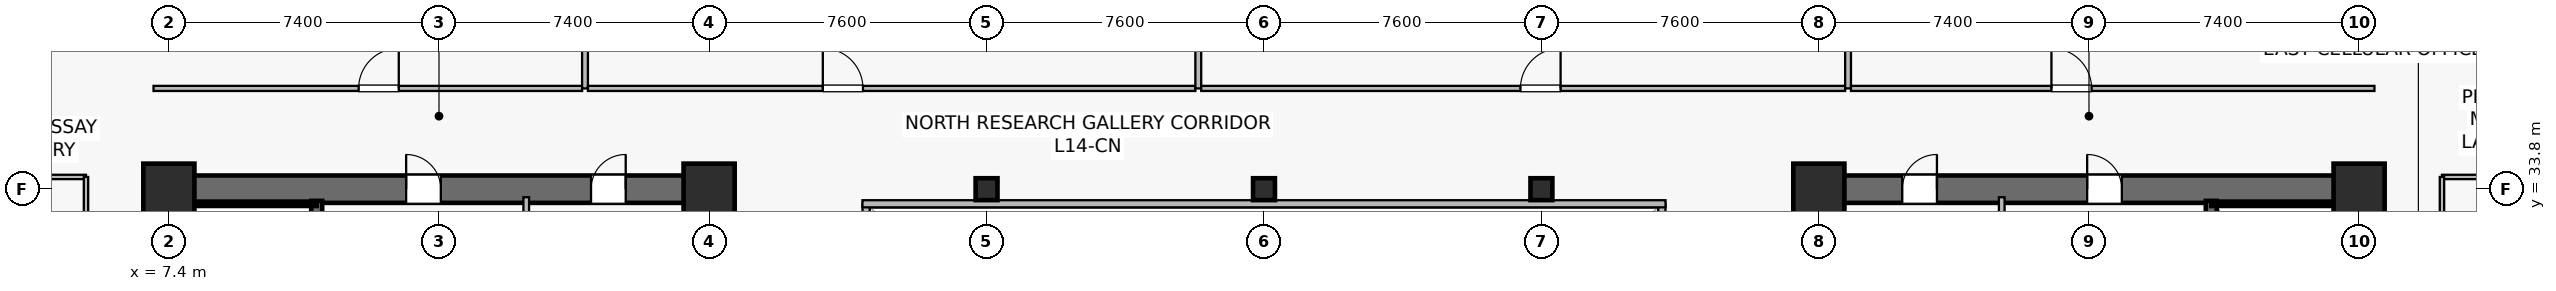
"""IFC4 building model, lengths in metres.
Left out: names, types, materials, properties, quantities, classifications, styles, units other than length and angle.
Written with IfcOpenShell. Run it as: python <this file> out.ifc"""

import sys

from ifc_helpers import new_model, si_unit, direction, frame, frame_2d, origin, origin_2d, place, context, subcontext, project, spatial, rectangle, hollow_rectangle, extrude, source, transform, mapped, element, fill, save


model = new_model("IFC4")
c1 = context("Model", 3, precision=1e-05, world=origin(), true_north=direction((0.0, 1.0)))
c2 = subcontext(c1, "Body", "Model", "MODEL_VIEW")
j1 = project(units=[si_unit("LENGTHUNIT", "METRE"), si_unit("PLANEANGLEUNIT", "RADIAN")], contexts=[c1])
p1 = place(None, origin())
s1 = spatial("IfcSite", under=j1, at=p1, CompositionType="ELEMENT")
p2 = place(p1, origin())
s2 = spatial("IfcBuilding", under=s1, at=p2, CompositionType="ELEMENT")
p3 = place(p2, frame((0.0, 0.0, 58.0)))
s3 = spatial("IfcBuildingStorey", under=s2, at=p3, CompositionType="ELEMENT", Elevation=58.0)
p4 = place(p3, frame((7.025, 33.8, 0.0), z_axis=(0.0, 0.0, 1.0), x_axis=(1.0, 0.0, 0.0)))
e1 = element("IfcWall", 1, at=p4, inside=s3, PredefinedType="SHEAR", context=c2, shape_type="SweptSolid", body=[
    extrude(rectangle(XDim=15.55, YDim=0.75, at=frame_2d((7.775, 0.0))), origin(), (0.0, 0.0, 1.0), 3.78),
])
p5 = place(p4, frame((6.875, 0.0, 0.0)))
e2 = element("IfcOpeningElement", 2, at=p5, cuts=e1, PredefinedType="OPENING", context=c2, shape_type="SweptSolid", body=[
    extrude(rectangle(XDim=0.95, YDim=2.15, at=frame_2d((0.475, 1.075))), frame((0.0, 0.385, 0.0), z_axis=(0.0, -1.0, 0.0), x_axis=(1.0, 0.0, 0.0)), (0.0, 0.0, 1.0), 0.77),
])
p6 = place(p4, frame((11.94, 0.0, 0.0)))
e3 = element("IfcOpeningElement", 3, at=p6, cuts=e1, PredefinedType="OPENING", context=c2, shape_type="SweptSolid", body=[
    extrude(rectangle(XDim=0.95, YDim=2.15, at=frame_2d((0.475, 1.075))), frame((0.0, 0.385, 0.0), z_axis=(0.0, -1.0, 0.0), x_axis=(1.0, 0.0, 0.0)), (0.0, 0.0, 1.0), 0.77),
])
p7 = place(p3, frame((7.4, 15.175, 0.0), z_axis=(0.0, 0.0, 1.0), x_axis=(0.0, 1.0, 0.0)))
e4 = element("IfcWall", 4, at=p7, inside=s3, PredefinedType="SHEAR", context=c2, shape_type="SweptSolid", body=[
    extrude(rectangle(XDim=18.25, YDim=0.75, at=frame_2d((9.125, 0.0))), origin(), (0.0, 0.0, 1.0), 3.78),
])
p8 = place(p3, frame((22.2, 15.175, 0.0), z_axis=(0.0, 0.0, 1.0), x_axis=(0.0, 1.0, 0.0)))
e5 = element("IfcWall", 5, at=p8, inside=s3, PredefinedType="SHEAR", context=c2, shape_type="SweptSolid", body=[
    extrude(rectangle(XDim=18.25, YDim=0.75, at=frame_2d((9.125, 0.0))), origin(), (0.0, 0.0, 1.0), 3.78),
])
p9 = place(p8, frame((3.375, 0.0, 0.0)))
e6 = element("IfcOpeningElement", 6, at=p9, cuts=e5, PredefinedType="OPENING", context=c2, shape_type="SweptSolid", body=[
    extrude(rectangle(XDim=1.42, YDim=2.2, at=frame_2d((0.71, 1.1))), frame((0.0, 0.385, 0.0), z_axis=(0.0, -1.0, 0.0), x_axis=(1.0, 0.0, 0.0)), (0.0, 0.0, 1.0), 0.77),
])
p10 = place(p3, frame((11.45, 24.85, 0.0), z_axis=(0.0, 0.0, 1.0), x_axis=(0.0, 1.0, 0.0)))
e7 = element("IfcWall", 7, at=p10, inside=s3, PredefinedType="SHEAR", context=c2, shape_type="SweptSolid", body=[
    extrude(rectangle(XDim=8.63, YDim=0.3, at=frame_2d((4.315, 0.0))), origin(), (0.0, 0.0, 1.0), 3.78),
])
p11 = place(p10, frame((0.42, 0.0, 0.0)))
e8 = element("IfcOpeningElement", 8, at=p11, cuts=e7, PredefinedType="OPENING", context=c2, shape_type="SweptSolid", body=[
    extrude(rectangle(XDim=1.1, YDim=2.15, at=frame_2d((0.55, 1.075))), frame((0.0, 0.16, 0.0), z_axis=(0.0, -1.0, 0.0), x_axis=(1.0, 0.0, 0.0)), (0.0, 0.0, 1.0), 0.32),
])
p12 = place(p3, frame((7.73, 33.4, 0.0), z_axis=(0.0, 0.0, 1.0), x_axis=(1.0, 0.0, 0.0)))
e9 = element("IfcWall", 9, at=p12, inside=s3, PredefinedType="SOLIDWALL", context=c2, shape_type="SweptSolid", body=[
    extrude(rectangle(XDim=3.72, YDim=0.12, at=frame_2d((1.86, 0.0))), origin(), (0.0, 0.0, 1.0), 3.78),
])
p13 = place(p3, frame((52.225, 33.8, 0.0), z_axis=(0.0, 0.0, 1.0), x_axis=(1.0, 0.0, 0.0)))
e10 = element("IfcWall", 10, at=p13, inside=s3, PredefinedType="SHEAR", context=c2, shape_type="SweptSolid", body=[
    extrude(rectangle(XDim=15.55, YDim=0.75, at=frame_2d((7.775, 0.0))), origin(), (0.0, 0.0, 1.0), 3.78),
])
p14 = place(p13, frame((7.725, 0.0, 0.0)))
e11 = element("IfcOpeningElement", 11, at=p14, cuts=e10, PredefinedType="OPENING", context=c2, shape_type="SweptSolid", body=[
    extrude(rectangle(XDim=0.95, YDim=2.15, at=frame_2d((0.475, 1.075))), frame((0.0, 0.385, 0.0), z_axis=(0.0, -1.0, 0.0), x_axis=(1.0, 0.0, 0.0)), (0.0, 0.0, 1.0), 0.77),
])
p15 = place(p13, frame((2.66, 0.0, 0.0)))
e12 = element("IfcOpeningElement", 12, at=p15, cuts=e10, PredefinedType="OPENING", context=c2, shape_type="SweptSolid", body=[
    extrude(rectangle(XDim=0.95, YDim=2.15, at=frame_2d((0.475, 1.075))), frame((0.0, 0.385, 0.0), z_axis=(0.0, -1.0, 0.0), x_axis=(1.0, 0.0, 0.0)), (0.0, 0.0, 1.0), 0.77),
])
p16 = place(p3, frame((52.6, 15.175, 0.0), z_axis=(0.0, 0.0, 1.0), x_axis=(0.0, 1.0, 0.0)))
e13 = element("IfcWall", 13, at=p16, inside=s3, PredefinedType="SHEAR", context=c2, shape_type="SweptSolid", body=[
    extrude(rectangle(XDim=18.25, YDim=0.75, at=frame_2d((9.125, 0.0))), origin(), (0.0, 0.0, 1.0), 3.78),
])
p17 = place(p16, frame((3.375, 0.0, 0.0)))
e14 = element("IfcOpeningElement", 14, at=p17, cuts=e13, PredefinedType="OPENING", context=c2, shape_type="SweptSolid", body=[
    extrude(rectangle(XDim=1.42, YDim=2.2, at=frame_2d((0.71, 1.1))), frame((0.0, 0.385, 0.0), z_axis=(0.0, -1.0, 0.0), x_axis=(1.0, 0.0, 0.0)), (0.0, 0.0, 1.0), 0.77),
])
p18 = place(p3, frame((67.4, 15.175, 0.0), z_axis=(0.0, 0.0, 1.0), x_axis=(0.0, 1.0, 0.0)))
e15 = element("IfcWall", 15, at=p18, inside=s3, PredefinedType="SHEAR", context=c2, shape_type="SweptSolid", body=[
    extrude(rectangle(XDim=18.25, YDim=0.75, at=frame_2d((9.125, 0.0))), origin(), (0.0, 0.0, 1.0), 3.78),
])
p19 = place(p3, frame((63.35, 24.85, 0.0), z_axis=(0.0, 0.0, 1.0), x_axis=(0.0, 1.0, 0.0)))
e16 = element("IfcWall", 16, at=p19, inside=s3, PredefinedType="SHEAR", context=c2, shape_type="SweptSolid", body=[
    extrude(rectangle(XDim=8.63, YDim=0.3, at=frame_2d((4.315, 0.0))), origin(), (0.0, 0.0, 1.0), 3.78),
])
p20 = place(p19, frame((0.42, 0.0, 0.0)))
e17 = element("IfcOpeningElement", 17, at=p20, cuts=e16, PredefinedType="OPENING", context=c2, shape_type="SweptSolid", body=[
    extrude(rectangle(XDim=1.1, YDim=2.15, at=frame_2d((0.55, 1.075))), frame((0.0, 0.16, 0.0), z_axis=(0.0, -1.0, 0.0), x_axis=(1.0, 0.0, 0.0)), (0.0, 0.0, 1.0), 0.32),
])
p21 = place(p3, frame((63.35, 33.4, 0.0), z_axis=(0.0, 0.0, 1.0), x_axis=(1.0, 0.0, 0.0)))
e18 = element("IfcWall", 18, at=p21, inside=s3, PredefinedType="SOLIDWALL", context=c2, shape_type="SweptSolid", body=[
    extrude(rectangle(XDim=3.72, YDim=0.12, at=frame_2d((1.86, 0.0))), origin(), (0.0, 0.0, 1.0), 3.78),
])
m1 = source(origin(), c2, "Body", "SweptSolid", [
    extrude(rectangle(XDim=1.4, YDim=1.4, at=origin_2d()), origin(), (0.0, 0.0, 1.0), 4.1),
])
for number, where, z_axis, x_axis in (
    (19, (7.4, 33.8, 0.0), (0.0, 0.0, 1.0), (1.0, 0.0, 0.0)),
    (20, (22.2, 33.8, 0.0), (0.0, 0.0, 1.0), (1.0, 0.0, 0.0)),
    (21, (52.6, 33.8, 0.0), (0.0, 0.0, 1.0), (1.0, 0.0, 0.0)),
    (22, (67.4, 33.8, 0.0), (0.0, 0.0, 1.0), (1.0, 0.0, 0.0)),
):
    element("IfcColumn", number, at=place(p3, frame(where, z_axis=z_axis, x_axis=x_axis)), inside=s3, PredefinedType="COLUMN", context=c2, shape_type="MappedRepresentation", body=[
        mapped(m1, transform((0.0, 0.0, 0.0), scale=1.0)),
    ])
m2 = source(origin(), c2, "Body", "SweptSolid", [
    extrude(hollow_rectangle(XDim=0.6, YDim=0.6, WallThickness=0.028, at=origin_2d()), origin(), (0.0, 0.0, 1.0), 4.1),
])
for number, where, z_axis, x_axis in (
    (23, (29.8, 33.8, 0.0), (0.0, 0.0, 1.0), (1.0, 0.0, 0.0)),
    (24, (37.4, 33.8, 0.0), (0.0, 0.0, 1.0), (1.0, 0.0, 0.0)),
    (25, (45.0, 33.8, 0.0), (0.0, 0.0, 1.0), (1.0, 0.0, 0.0)),
):
    element("IfcColumn", number, at=place(p3, frame(where, z_axis=z_axis, x_axis=x_axis)), inside=s3, PredefinedType="COLUMN", context=c2, shape_type="MappedRepresentation", body=[
        mapped(m2, transform((0.0, 0.0, 0.0), scale=1.0)),
    ])
for number, where, z_axis, x_axis in (
    (26, (17.19, 29.65, 0.0), (0.0, 0.0, 1.0), (0.0, 1.0, 0.0)),
    (27, (57.61, 29.65, 0.0), (0.0, 0.0, 1.0), (0.0, 1.0, 0.0)),
):
    element("IfcWall", number, at=place(p3, frame(where, z_axis=z_axis, x_axis=x_axis)), inside=s3, PredefinedType="PLUMBINGWALL", context=c2, shape_type="SweptSolid", body=[
        extrude(rectangle(XDim=3.93, YDim=0.155, at=frame_2d((1.965, 0.0))), origin(), (0.0, 0.0, 1.0), 3.78),
    ])
p22 = place(p3, frame((26.5, 15.2, 0.0), z_axis=(0.0, 0.0, 1.0), x_axis=(0.0, 1.0, 0.0)))
e28 = element("IfcWall", 28, at=p22, inside=s3, PredefinedType="SOLIDWALL", context=c2, shape_type="SweptSolid", body=[
    extrude(rectangle(XDim=18.2, YDim=0.195, at=frame_2d((9.1, 0.0))), origin(), (0.0, 0.0, 1.0), 3.78),
])
p23 = place(p22, frame((1.8, 0.0, 0.9)))
e29 = element("IfcOpeningElement", 29, at=p23, cuts=e28, PredefinedType="OPENING", context=c2, shape_type="SweptSolid", body=[
    extrude(rectangle(XDim=1.5, YDim=1.4, at=frame_2d((0.75, 0.7))), frame((0.0, 0.107, 0.0), z_axis=(0.0, -1.0, 0.0), x_axis=(1.0, 0.0, 0.0)), (0.0, 0.0, 1.0), 0.215),
])
p24 = place(p22, frame((13.2, 0.0, 0.9)))
e30 = element("IfcOpeningElement", 30, at=p24, cuts=e28, PredefinedType="OPENING", context=c2, shape_type="SweptSolid", body=[
    extrude(rectangle(XDim=1.5, YDim=1.4, at=frame_2d((0.75, 0.7))), frame((0.0, 0.107, 0.0), z_axis=(0.0, -1.0, 0.0), x_axis=(1.0, 0.0, 0.0)), (0.0, 0.0, 1.0), 0.215),
])
p25 = place(p3, frame((48.3, 15.2, 0.0), z_axis=(0.0, 0.0, 1.0), x_axis=(0.0, 1.0, 0.0)))
e31 = element("IfcWall", 31, at=p25, inside=s3, PredefinedType="SOLIDWALL", context=c2, shape_type="SweptSolid", body=[
    extrude(rectangle(XDim=18.2, YDim=0.195, at=frame_2d((9.1, 0.0))), origin(), (0.0, 0.0, 1.0), 3.78),
])
p26 = place(p25, frame((1.8, 0.0, 0.9)))
e32 = element("IfcOpeningElement", 32, at=p26, cuts=e31, PredefinedType="OPENING", context=c2, shape_type="SweptSolid", body=[
    extrude(rectangle(XDim=1.5, YDim=1.4, at=frame_2d((0.75, 0.7))), frame((0.0, 0.107, 0.0), z_axis=(0.0, -1.0, 0.0), x_axis=(1.0, 0.0, 0.0)), (0.0, 0.0, 1.0), 0.215),
])
p27 = place(p25, frame((13.2, 0.0, 0.9)))
e33 = element("IfcOpeningElement", 33, at=p27, cuts=e31, PredefinedType="OPENING", context=c2, shape_type="SweptSolid", body=[
    extrude(rectangle(XDim=1.5, YDim=1.4, at=frame_2d((0.75, 0.7))), frame((0.0, 0.107, 0.0), z_axis=(0.0, -1.0, 0.0), x_axis=(1.0, 0.0, 0.0)), (0.0, 0.0, 1.0), 0.215),
])
p28 = place(p3, frame((26.4, 33.4, 0.0), z_axis=(0.0, 0.0, 1.0), x_axis=(1.0, 0.0, 0.0)))
e34 = element("IfcWall", 34, at=p28, inside=s3, PredefinedType="SOLIDWALL", context=c2, shape_type="SweptSolid", body=[
    extrude(rectangle(XDim=22.0, YDim=0.195, at=frame_2d((11.0, 0.0))), origin(), (0.0, 0.0, 1.0), 3.78),
])
p29 = place(p3, frame((6.98, 36.56, 0.0), z_axis=(0.0, 0.0, 1.0), x_axis=(1.0, 0.0, 0.0)))
e35 = element("IfcWall", 35, at=p29, inside=s3, PredefinedType="PARTITIONING", context=c2, shape_type="SweptSolid", body=[
    extrude(rectangle(XDim=11.74, YDim=0.14, at=frame_2d((5.87, 0.0))), origin(), (0.0, 0.0, 1.0), 3.065),
])
p30 = place(p29, frame((5.618, 0.0, 0.0)))
e36 = element("IfcOpeningElement", 36, at=p30, cuts=e35, PredefinedType="OPENING", context=c2, shape_type="SweptSolid", body=[
    extrude(rectangle(XDim=1.1, YDim=2.18, at=frame_2d((0.55, 1.09))), frame((0.0, 0.08, 0.0), z_axis=(0.0, -1.0, 0.0), x_axis=(1.0, 0.0, 0.0)), (0.0, 0.0, 1.0), 0.16),
])
p31 = place(p3, frame((18.8, 36.56, 0.0), z_axis=(0.0, 0.0, 1.0), x_axis=(0.0, 1.0, 0.0)))
e37 = element("IfcWall", 37, at=p31, inside=s3, PredefinedType="PARTITIONING", context=c2, shape_type="SweptSolid", body=[
    extrude(rectangle(XDim=11.93, YDim=0.16, at=frame_2d((5.965, 0.0))), origin(), (0.0, 0.0, 1.0), 3.015),
])
p32 = place(p3, frame((18.88, 36.56, 0.0), z_axis=(0.0, 0.0, 1.0), x_axis=(1.0, 0.0, 0.0)))
e38 = element("IfcWall", 38, at=p32, inside=s3, PredefinedType="PARTITIONING", context=c2, shape_type="SweptSolid", body=[
    extrude(rectangle(XDim=16.64, YDim=0.14, at=frame_2d((8.32, 0.0))), origin(), (0.0, 0.0, 1.0), 3.065),
])
p33 = place(p32, frame((6.434, 0.0, 0.0)))
e39 = element("IfcOpeningElement", 39, at=p33, cuts=e38, PredefinedType="OPENING", context=c2, shape_type="SweptSolid", body=[
    extrude(rectangle(XDim=1.1, YDim=2.18, at=frame_2d((0.55, 1.09))), frame((0.0, 0.08, 0.0), z_axis=(0.0, -1.0, 0.0), x_axis=(1.0, 0.0, 0.0)), (0.0, 0.0, 1.0), 0.16),
])
p34 = place(p3, frame((35.6, 36.56, 0.0), z_axis=(0.0, 0.0, 1.0), x_axis=(0.0, 1.0, 0.0)))
e40 = element("IfcWall", 40, at=p34, inside=s3, PredefinedType="PARTITIONING", context=c2, shape_type="SweptSolid", body=[
    extrude(rectangle(XDim=10.73, YDim=0.16, at=frame_2d((5.365, 0.0))), origin(), (0.0, 0.0, 1.0), 3.015),
])
p35 = place(p3, frame((35.68, 36.56, 0.0), z_axis=(0.0, 0.0, 1.0), x_axis=(1.0, 0.0, 0.0)))
e41 = element("IfcWall", 41, at=p35, inside=s3, PredefinedType="PARTITIONING", context=c2, shape_type="SweptSolid", body=[
    extrude(rectangle(XDim=17.64, YDim=0.14, at=frame_2d((8.82, 0.0))), origin(), (0.0, 0.0, 1.0), 3.065),
])
p36 = place(p35, frame((8.745, 0.0, 0.0)))
e42 = element("IfcOpeningElement", 42, at=p36, cuts=e41, PredefinedType="OPENING", context=c2, shape_type="SweptSolid", body=[
    extrude(rectangle(XDim=1.1, YDim=2.18, at=frame_2d((0.55, 1.09))), frame((0.0, 0.08, 0.0), z_axis=(0.0, -1.0, 0.0), x_axis=(1.0, 0.0, 0.0)), (0.0, 0.0, 1.0), 0.16),
])
p37 = place(p3, frame((53.4, 36.56, 0.0), z_axis=(0.0, 0.0, 1.0), x_axis=(0.0, 1.0, 0.0)))
e43 = element("IfcWall", 43, at=p37, inside=s3, PredefinedType="PARTITIONING", context=c2, shape_type="SweptSolid", body=[
    extrude(rectangle(XDim=11.93, YDim=0.16, at=frame_2d((5.965, 0.0))), origin(), (0.0, 0.0, 1.0), 3.015),
])
p38 = place(p3, frame((53.48, 36.56, 0.0), z_axis=(0.0, 0.0, 1.0), x_axis=(1.0, 0.0, 0.0)))
e44 = element("IfcWall", 44, at=p38, inside=s3, PredefinedType="PARTITIONING", context=c2, shape_type="SweptSolid", body=[
    extrude(rectangle(XDim=14.34, YDim=0.14, at=frame_2d((7.17, 0.0))), origin(), (0.0, 0.0, 1.0), 3.065),
])
p39 = place(p38, frame((5.491, 0.0, 0.0)))
e45 = element("IfcOpeningElement", 45, at=p39, cuts=e44, PredefinedType="OPENING", context=c2, shape_type="SweptSolid", body=[
    extrude(rectangle(XDim=1.1, YDim=2.18, at=frame_2d((0.55, 1.09))), frame((0.0, 0.08, 0.0), z_axis=(0.0, -1.0, 0.0), x_axis=(1.0, 0.0, 0.0)), (0.0, 0.0, 1.0), 0.16),
])
p40 = place(p3, frame((0.11, 34.135, 0.0), z_axis=(0.0, 0.0, 1.0), x_axis=(1.0, 0.0, 0.0)))
e46 = element("IfcWall", 46, at=p40, inside=s3, PredefinedType="PARTITIONING", context=c2, shape_type="SweptSolid", body=[
    extrude(rectangle(XDim=5.02, YDim=0.12, at=frame_2d((2.51, 0.0))), origin(), (0.0, 0.0, 1.0), 3.78),
])
p41 = place(p3, frame((5.13, 28.66, 0.0), z_axis=(0.0, 0.0, 1.0), x_axis=(0.0, 1.0, 0.0)))
e47 = element("IfcWall", 47, at=p41, inside=s3, PredefinedType="PARTITIONING", context=c2, shape_type="SweptSolid", body=[
    extrude(rectangle(XDim=5.475, YDim=0.12, at=frame_2d((2.738, 0.0))), origin(), (0.0, 0.0, 1.0), 3.78),
])
p42 = place(p41, frame((2.288, 0.0, 0.0)))
e48 = element("IfcOpeningElement", 48, at=p42, cuts=e47, PredefinedType="OPENING", context=c2, shape_type="SweptSolid", body=[
    extrude(rectangle(XDim=0.9, YDim=2.1, at=frame_2d((0.45, 1.05))), frame((0.0, 0.07, 0.0), z_axis=(0.0, -1.0, 0.0), x_axis=(1.0, 0.0, 0.0)), (0.0, 0.0, 1.0), 0.14),
])
p43 = place(p3, frame((69.67, 34.135, 0.0), z_axis=(0.0, 0.0, 1.0), x_axis=(1.0, 0.0, 0.0)))
e49 = element("IfcWall", 49, at=p43, inside=s3, PredefinedType="PARTITIONING", context=c2, shape_type="SweptSolid", body=[
    extrude(rectangle(XDim=5.02, YDim=0.12, at=frame_2d((2.51, 0.0))), origin(), (0.0, 0.0, 1.0), 3.78),
])
p44 = place(p3, frame((69.67, 29.46, 0.0), z_axis=(0.0, 0.0, 1.0), x_axis=(0.0, 1.0, 0.0)))
e50 = element("IfcWall", 50, at=p44, inside=s3, PredefinedType="PARTITIONING", context=c2, shape_type="SweptSolid", body=[
    extrude(rectangle(XDim=4.675, YDim=0.12, at=frame_2d((2.337, 0.0))), origin(), (0.0, 0.0, 1.0), 3.78),
])
p45 = place(p44, frame((1.887, 0.0, 0.0)))
e51 = element("IfcOpeningElement", 51, at=p45, cuts=e50, PredefinedType="OPENING", context=c2, shape_type="SweptSolid", body=[
    extrude(rectangle(XDim=0.9, YDim=2.1, at=frame_2d((0.45, 1.05))), frame((0.0, 0.07, 0.0), z_axis=(0.0, -1.0, 0.0), x_axis=(1.0, 0.0, 0.0)), (0.0, 0.0, 1.0), 0.14),
])
m3 = source(origin(), c2, "Body", "SweptSolid", [
    extrude(rectangle(XDim=0.95, YDim=2.15, at=frame_2d((0.475, 1.075))), frame((0.0, 0.025, 0.0), z_axis=(0.0, -1.0, 0.0), x_axis=(1.0, 0.0, 0.0)), (0.0, 0.0, 1.0), 0.05),
])
p46 = place(p5, origin())
e52 = element("IfcDoor", 52, at=p46, inside=s3, OperationType="SINGLE_SWING_LEFT", PredefinedType="DOOR", context=c2, shape_type="MappedRepresentation", body=[
    mapped(m3, transform((0.0, 0.0, 0.0), scale=1.0)),
])
fill(e2, e52)
p47 = place(p6, origin())
e53 = element("IfcDoor", 53, at=p47, inside=s3, OperationType="SINGLE_SWING_RIGHT", PredefinedType="DOOR", context=c2, shape_type="MappedRepresentation", body=[
    mapped(m3, transform((0.0, 0.0, 0.0), scale=1.0)),
])
fill(e3, e53)
p48 = place(p14, origin())
e54 = element("IfcDoor", 54, at=p48, inside=s3, OperationType="SINGLE_SWING_LEFT", PredefinedType="DOOR", context=c2, shape_type="MappedRepresentation", body=[
    mapped(m3, transform((0.0, 0.0, 0.0), scale=1.0)),
])
fill(e11, e54)
p49 = place(p15, origin())
e55 = element("IfcDoor", 55, at=p49, inside=s3, OperationType="SINGLE_SWING_RIGHT", PredefinedType="DOOR", context=c2, shape_type="MappedRepresentation", body=[
    mapped(m3, transform((0.0, 0.0, 0.0), scale=1.0)),
])
fill(e12, e55)
m4 = source(origin(), c2, "Body", "SweptSolid", [
    extrude(rectangle(XDim=1.1, YDim=2.18, at=frame_2d((0.55, 1.09))), frame((0.0, 0.025, 0.0), z_axis=(0.0, -1.0, 0.0), x_axis=(1.0, 0.0, 0.0)), (0.0, 0.0, 1.0), 0.05),
])
p50 = place(p30, origin())
e56 = element("IfcDoor", 56, at=p50, inside=s3, OperationType="SINGLE_SWING_RIGHT", PredefinedType="DOOR", context=c2, shape_type="MappedRepresentation", body=[
    mapped(m4, transform((0.0, 0.0, 0.0), scale=1.0)),
])
fill(e36, e56)
p51 = place(p33, origin())
e57 = element("IfcDoor", 57, at=p51, inside=s3, OperationType="SINGLE_SWING_LEFT", PredefinedType="DOOR", context=c2, shape_type="MappedRepresentation", body=[
    mapped(m4, transform((0.0, 0.0, 0.0), scale=1.0)),
])
fill(e39, e57)
p52 = place(p36, origin())
e58 = element("IfcDoor", 58, at=p52, inside=s3, OperationType="SINGLE_SWING_RIGHT", PredefinedType="DOOR", context=c2, shape_type="MappedRepresentation", body=[
    mapped(m4, transform((0.0, 0.0, 0.0), scale=1.0)),
])
fill(e42, e58)
p53 = place(p39, origin())
e59 = element("IfcDoor", 59, at=p53, inside=s3, OperationType="SINGLE_SWING_LEFT", PredefinedType="DOOR", context=c2, shape_type="MappedRepresentation", body=[
    mapped(m4, transform((0.0, 0.0, 0.0), scale=1.0)),
])
fill(e45, e59)
save(model, sys.argv[1])
